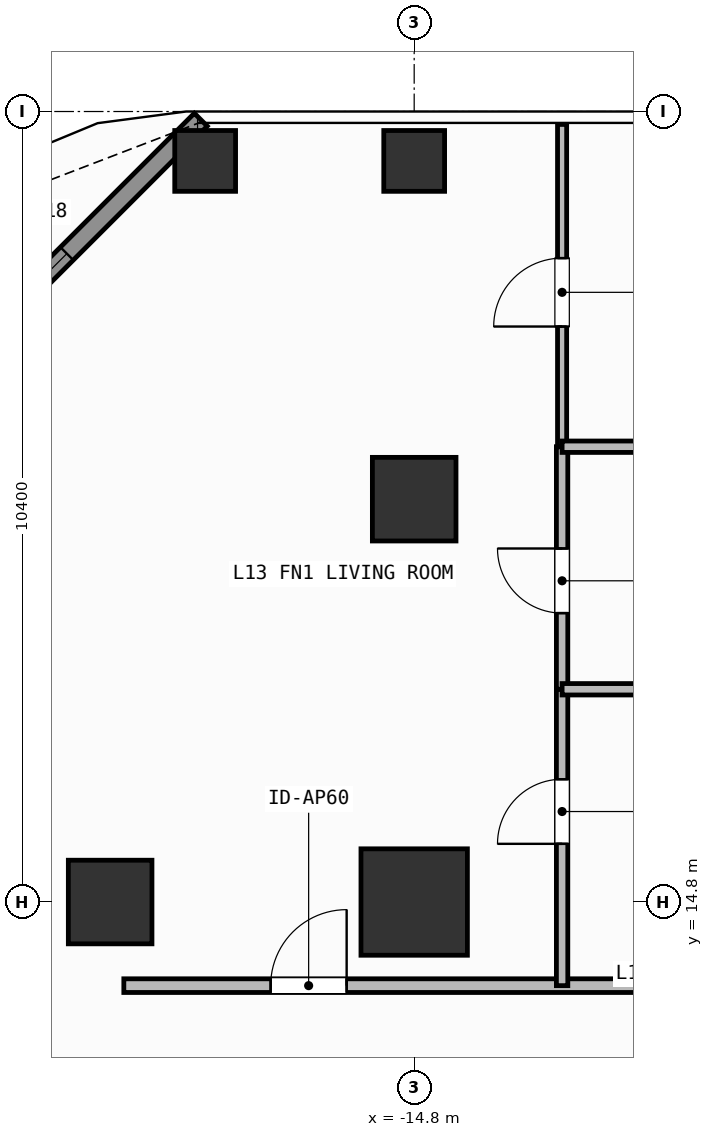
"""IFC4 building model, lengths in metres.
Left out: names, types, materials, properties, quantities, classifications, styles, units other than length and angle.
Written with IfcOpenShell. Run it as: python <this file> out.ifc"""

import sys

from ifc_helpers import new_model, si_unit, direction, frame, frame_2d, origin, origin_2d, place, context, subcontext, project, spatial, rectangle, hollow_rectangle, extrude, element, fill, save


model = new_model("IFC4")
c1 = context("Model", 3, precision=1e-05, world=origin(), true_north=direction((0.0, 1.0)))
c2 = subcontext(c1, "Body", "Model", "MODEL_VIEW")
j1 = project(units=[si_unit("LENGTHUNIT", "METRE"), si_unit("PLANEANGLEUNIT", "RADIAN")], contexts=[c1])
p1 = place(None, origin())
s1 = spatial("IfcSite", under=j1, at=p1, CompositionType="ELEMENT")
p2 = place(p1, origin())
s2 = spatial("IfcBuilding", under=s1, at=p2, CompositionType="ELEMENT")
p3 = place(p2, frame((0.0, 0.0, 50.1)))
s3 = spatial("IfcBuildingStorey", under=s2, at=p3, CompositionType="ELEMENT", Elevation=50.1)
p4 = place(p3, frame((-14.8, 14.8, 0.0), z_axis=(0.0, 0.0, 1.0), x_axis=(1.0, 0.0, 0.0)))
e1 = element("IfcColumn", 1, at=p4, inside=s3, PredefinedType="COLUMN", context=c2, shape_type="SweptSolid", body=[
    extrude(rectangle(XDim=1.4, YDim=1.4, at=origin_2d()), origin(), (0.0, 0.0, 1.0), 3.9),
])
for number, where, z_axis, x_axis in (
    (2, (-18.8, 14.8, 0.0), (0.0, 0.0, 1.0), (1.0, 0.0, 0.0)),
    (3, (-14.8, 20.1, 0.0), (0.0, 0.0, 1.0), (1.0, 0.0, 0.0)),
):
    element("IfcColumn", number, at=place(p3, frame(where, z_axis=z_axis, x_axis=x_axis)), inside=s3, PredefinedType="COLUMN", context=c2, shape_type="SweptSolid", body=[
        extrude(rectangle(XDim=1.1, YDim=1.1, at=origin_2d()), origin(), (0.0, 0.0, 1.0), 3.9),
    ])
for number, where, z_axis, x_axis in (
    (4, (-17.55, 24.55, 0.0), (0.0, 0.0, 1.0), (1.0, 0.0, 0.0)),
    (5, (-14.8, 24.55, 0.0), (0.0, 0.0, 1.0), (1.0, 0.0, 0.0)),
):
    element("IfcColumn", number, at=place(p3, frame(where, z_axis=z_axis, x_axis=x_axis)), inside=s3, PredefinedType="COLUMN", context=c2, shape_type="SweptSolid", body=[
        extrude(hollow_rectangle(XDim=0.8, YDim=0.8, WallThickness=0.036, at=origin_2d()), origin(), (0.0, 0.0, 1.0), 3.9),
    ])
p5 = place(p3, frame((-22.192, 20.508, 0.0), z_axis=(0.0, 0.0, 1.0), x_axis=(0.707106781187, 0.707106781187, 0.0)))
e6 = element("IfcWall", 6, at=p5, inside=s3, PredefinedType="SOLIDWALL", context=c2, shape_type="SweptSolid", body=[
    extrude(rectangle(XDim=6.484, YDim=0.24, at=frame_2d((3.242, 0.0))), origin(), (0.0, 0.0, 1.0), 3.62),
])
p6 = place(p5, frame((2.492, 0.0, 0.8)))
e7 = element("IfcOpeningElement", 7, at=p6, cuts=e6, PredefinedType="OPENING", context=c2, shape_type="SweptSolid", body=[
    extrude(rectangle(XDim=1.5, YDim=1.85, at=frame_2d((0.75, 0.925))), frame((0.0, 0.13, 0.0), z_axis=(0.0, -1.0, 0.0), x_axis=(1.0, 0.0, 0.0)), (0.0, 0.0, 1.0), 0.26),
])
p7 = place(p3, frame((-18.62, 13.7, 0.0), z_axis=(0.0, 0.0, 1.0), x_axis=(1.0, 0.0, 0.0)))
e8 = element("IfcWall", 8, at=p7, inside=s3, PredefinedType="PARTITIONING", context=c2, shape_type="SweptSolid", body=[
    extrude(rectangle(XDim=9.469, YDim=0.18, at=frame_2d((4.735, 0.0))), origin(), (0.0, 0.0, 1.0), 3.62),
])
p8 = place(p7, frame((1.931, 0.0, 0.0)))
e9 = element("IfcOpeningElement", 9, at=p8, cuts=e8, PredefinedType="OPENING", context=c2, shape_type="SweptSolid", body=[
    extrude(rectangle(XDim=1.0, YDim=2.2, at=frame_2d((0.5, 1.1))), frame((0.0, 0.1, 0.0), z_axis=(0.0, -1.0, 0.0), x_axis=(1.0, 0.0, 0.0)), (0.0, 0.0, 1.0), 0.2),
])
p9 = place(p3, frame((-12.854, 13.7, 0.0), z_axis=(0.0, 0.0, 1.0), x_axis=(0.0, 1.0, 0.0)))
e10 = element("IfcWall", 10, at=p9, inside=s3, PredefinedType="PARTITIONING", context=c2, shape_type="SweptSolid", body=[
    extrude(rectangle(XDim=3.899, YDim=0.15, at=frame_2d((1.95, 0.0))), origin(), (0.0, 0.0, 1.0), 3.62),
])
p10 = place(p9, frame((1.865, 0.0, 0.0)))
e11 = element("IfcOpeningElement", 11, at=p10, cuts=e10, PredefinedType="OPENING", context=c2, shape_type="SweptSolid", body=[
    extrude(rectangle(XDim=0.85, YDim=2.1, at=frame_2d((0.425, 1.05))), frame((0.0, 0.085, 0.0), z_axis=(0.0, -1.0, 0.0), x_axis=(1.0, 0.0, 0.0)), (0.0, 0.0, 1.0), 0.17),
])
p11 = place(p3, frame((-12.854, 17.599, 0.0), z_axis=(0.0, 0.0, 1.0), x_axis=(0.0, 1.0, 0.0)))
e12 = element("IfcWall", 12, at=p11, inside=s3, PredefinedType="PARTITIONING", context=c2, shape_type="SweptSolid", body=[
    extrude(rectangle(XDim=3.191, YDim=0.15, at=frame_2d((1.595, 0.0))), origin(), (0.0, 0.0, 1.0), 3.62),
])
p12 = place(p11, frame((1.002, 0.0, 0.0)))
e13 = element("IfcOpeningElement", 13, at=p12, cuts=e12, PredefinedType="OPENING", context=c2, shape_type="SweptSolid", body=[
    extrude(rectangle(XDim=0.85, YDim=2.1, at=frame_2d((0.425, 1.05))), frame((0.0, 0.085, 0.0), z_axis=(0.0, -1.0, 0.0), x_axis=(1.0, 0.0, 0.0)), (0.0, 0.0, 1.0), 0.17),
])
p13 = place(p3, frame((-12.854, 20.79, 0.0), z_axis=(0.0, 0.0, 1.0), x_axis=(0.0, 1.0, 0.0)))
e14 = element("IfcWall", 14, at=p13, inside=s3, PredefinedType="PARTITIONING", context=c2, shape_type="SweptSolid", body=[
    extrude(rectangle(XDim=4.24, YDim=0.12, at=frame_2d((2.12, 0.0))), origin(), (0.0, 0.0, 1.0), 3.62),
])
p14 = place(p13, frame((1.581, 0.0, 0.0)))
e15 = element("IfcOpeningElement", 15, at=p14, cuts=e14, PredefinedType="OPENING", context=c2, shape_type="SweptSolid", body=[
    extrude(rectangle(XDim=0.9, YDim=2.1, at=frame_2d((0.45, 1.05))), frame((0.0, 0.07, 0.0), z_axis=(0.0, -1.0, 0.0), x_axis=(1.0, 0.0, 0.0)), (0.0, 0.0, 1.0), 0.14),
])
for number, where, z_axis, x_axis in (
    (16, (-12.854, 17.599, 0.0), (0.0, 0.0, 1.0), (1.0, 0.0, 0.0)),
    (17, (-12.854, 20.79, 0.0), (0.0, 0.0, 1.0), (1.0, 0.0, 0.0)),
):
    element("IfcWall", number, at=place(p3, frame(where, z_axis=z_axis, x_axis=x_axis)), inside=s3, PredefinedType="PARTITIONING", context=c2, shape_type="SweptSolid", body=[
        extrude(rectangle(XDim=3.703, YDim=0.15, at=frame_2d((1.852, 0.0))), origin(), (0.0, 0.0, 1.0), 3.62),
    ])
p15 = place(p6, origin())
e18 = element("IfcWindow", 18, at=p15, inside=s3, PartitioningType="SINGLE_PANEL", PredefinedType="WINDOW", context=c2, shape_type="SweptSolid", body=[
    extrude(rectangle(XDim=1.5, YDim=1.85, at=frame_2d((0.75, 0.925))), frame((0.0, 0.03, 0.0), z_axis=(0.0, -1.0, 0.0), x_axis=(1.0, 0.0, 0.0)), (0.0, 0.0, 1.0), 0.06),
])
fill(e7, e18)
p16 = place(p8, origin())
e19 = element("IfcDoor", 19, at=p16, inside=s3, OperationType="SINGLE_SWING_RIGHT", PredefinedType="DOOR", context=c2, shape_type="SweptSolid", body=[
    extrude(rectangle(XDim=1.0, YDim=2.2, at=frame_2d((0.5, 1.1))), frame((0.0, 0.025, 0.0), z_axis=(0.0, -1.0, 0.0), x_axis=(1.0, 0.0, 0.0)), (0.0, 0.0, 1.0), 0.05),
])
fill(e9, e19)
p17 = place(p10, origin())
e20 = element("IfcDoor", 20, at=p17, inside=s3, OperationType="SINGLE_SWING_LEFT", PredefinedType="DOOR", context=c2, shape_type="SweptSolid", body=[
    extrude(rectangle(XDim=0.85, YDim=2.1, at=frame_2d((0.425, 1.05))), frame((0.0, 0.025, 0.0), z_axis=(0.0, -1.0, 0.0), x_axis=(1.0, 0.0, 0.0)), (0.0, 0.0, 1.0), 0.05),
])
fill(e11, e20)
p18 = place(p12, origin())
e21 = element("IfcDoor", 21, at=p18, inside=s3, OperationType="SINGLE_SWING_RIGHT", PredefinedType="DOOR", context=c2, shape_type="SweptSolid", body=[
    extrude(rectangle(XDim=0.85, YDim=2.1, at=frame_2d((0.425, 1.05))), frame((0.0, 0.025, 0.0), z_axis=(0.0, -1.0, 0.0), x_axis=(1.0, 0.0, 0.0)), (0.0, 0.0, 1.0), 0.05),
])
fill(e13, e21)
p19 = place(p14, origin())
e22 = element("IfcDoor", 22, at=p19, inside=s3, OperationType="SINGLE_SWING_LEFT", PredefinedType="DOOR", context=c2, shape_type="SweptSolid", body=[
    extrude(rectangle(XDim=0.9, YDim=2.1, at=frame_2d((0.45, 1.05))), frame((0.0, 0.025, 0.0), z_axis=(0.0, -1.0, 0.0), x_axis=(1.0, 0.0, 0.0)), (0.0, 0.0, 1.0), 0.05),
])
fill(e15, e22)
save(model, sys.argv[1])
